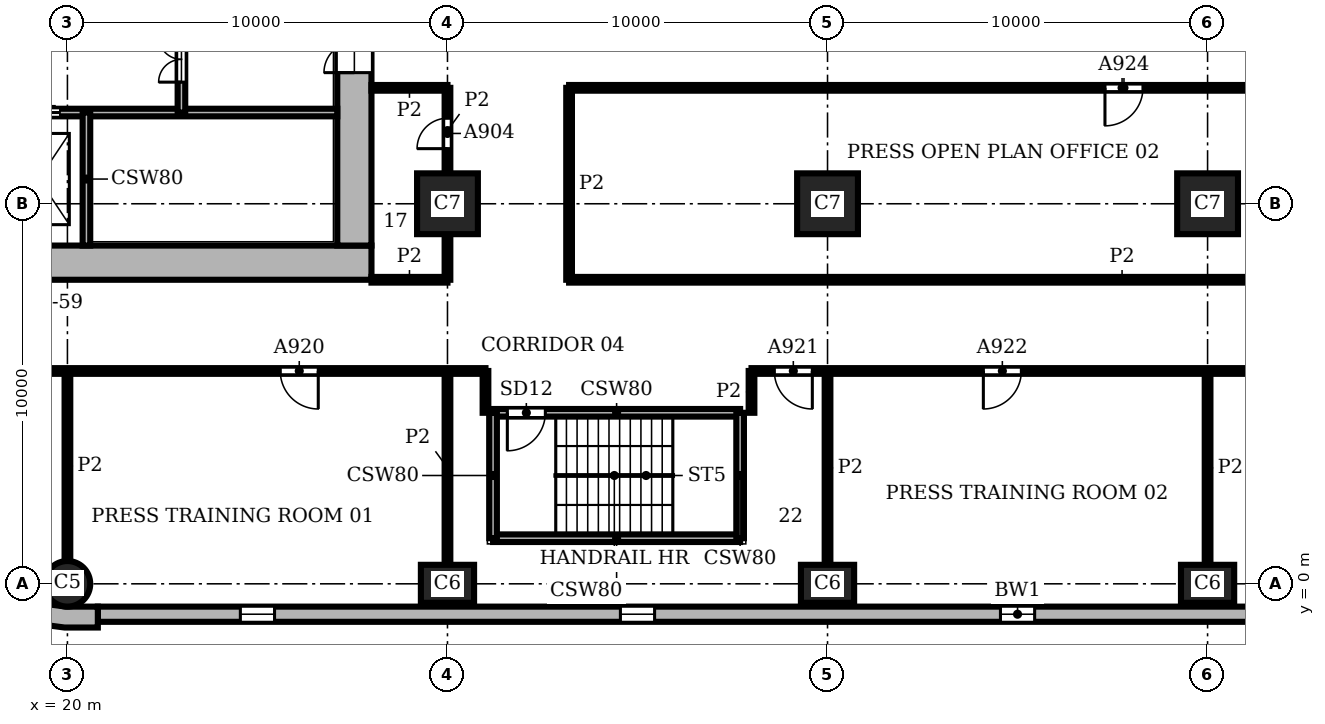
"""IFC4 building model, lengths in metres.
Left out: names, types, materials, properties, quantities, classifications, styles, units other than length and angle.
Written with IfcOpenShell. Run it as: python <this file> out.ifc"""

import sys

from ifc_helpers import new_model, si_unit, direction, frame, frame_2d, origin, origin_2d, place, context, subcontext, project, spatial, polyline, rectangle, circle, outline, extrude, element, fill, save


model = new_model("IFC4")
c1 = context("Model", 3, precision=1e-05, world=origin(), true_north=direction((0.0, 1.0)))
c2 = subcontext(c1, "Body", "Model", "MODEL_VIEW")
j1 = project(units=[si_unit("LENGTHUNIT", "METRE"), si_unit("PLANEANGLEUNIT", "RADIAN")], contexts=[c1])
p1 = place(None, origin())
s1 = spatial("IfcSite", under=j1, at=p1, CompositionType="ELEMENT")
p2 = place(p1, origin())
s2 = spatial("IfcBuilding", under=s1, at=p2, CompositionType="ELEMENT")
p3 = place(p2, frame((0.0, 0.0, 105.6)))
s3 = spatial("IfcBuildingStorey", under=s2, at=p3, CompositionType="ELEMENT", Elevation=105.6)
p4 = place(p3, frame((20.0, 0.0, 0.0), z_axis=(0.0, 0.0, 1.0), x_axis=(1.0, 0.0, 0.0)))
e1 = element("IfcColumn", 1, at=p4, inside=s3, PredefinedType="COLUMN", context=c2, shape_type="SweptSolid", body=[
    extrude(circle(Radius=0.6, at=origin_2d()), origin(), (0.0, 0.0, 1.0), 3.9),
])
for number, where, z_axis, x_axis in (
    (2, (30.0, 0.0, 0.0), (0.0, 0.0, 1.0), (1.0, 0.0, 0.0)),
    (3, (40.0, 0.0, 0.0), (0.0, 0.0, 1.0), (1.0, 0.0, 0.0)),
    (4, (50.0, 0.0, 0.0), (0.0, 0.0, 1.0), (1.0, 0.0, 0.0)),
):
    element("IfcColumn", number, at=place(p3, frame(where, z_axis=z_axis, x_axis=x_axis)), inside=s3, PredefinedType="COLUMN", context=c2, shape_type="SweptSolid", body=[
        extrude(rectangle(XDim=1.4, YDim=1.0, at=origin_2d()), origin(), (0.0, 0.0, 1.0), 3.9),
    ])
for number, where, z_axis, x_axis in (
    (5, (30.0, 10.0, 0.0), (0.0, 0.0, 1.0), (1.0, 0.0, 0.0)),
    (6, (40.0, 10.0, 0.0), (0.0, 0.0, 1.0), (1.0, 0.0, 0.0)),
    (7, (50.0, 10.0, 0.0), (0.0, 0.0, 1.0), (1.0, 0.0, 0.0)),
):
    element("IfcColumn", number, at=place(p3, frame(where, z_axis=z_axis, x_axis=x_axis)), inside=s3, PredefinedType="COLUMN", context=c2, shape_type="SweptSolid", body=[
        extrude(rectangle(XDim=1.6, YDim=1.6, at=origin_2d()), origin(), (0.0, 0.0, 1.0), 3.9),
    ])
p5 = place(p3, frame((8.0, 8.45, 0.0), z_axis=(0.0, 0.0, 1.0), x_axis=(1.0, 0.0, 0.0)))
e8 = element("IfcWall", 8, at=p5, inside=s3, PredefinedType="SHEAR", context=c2, shape_type="SweptSolid", body=[
    extrude(rectangle(XDim=20.0, YDim=0.9, at=frame_2d((10.0, 0.0))), origin(), (0.0, 0.0, 1.0), 3.9),
])
p6 = place(p3, frame((27.55, 8.9, 0.0), z_axis=(0.0, 0.0, 1.0), x_axis=(0.0, 1.0, 0.0)))
e9 = element("IfcWall", 9, at=p6, inside=s3, PredefinedType="SHEAR", context=c2, shape_type="SweptSolid", body=[
    extrude(rectangle(XDim=18.2, YDim=0.9, at=frame_2d((9.1, 0.0))), origin(), (0.0, 0.0, 1.0), 3.9),
])
p7 = place(p6, frame((4.55, 0.0, 0.0)))
e10 = element("IfcOpeningElement", 10, at=p7, cuts=e9, PredefinedType="OPENING", context=c2, shape_type="SweptSolid", body=[
    extrude(rectangle(XDim=1.6, YDim=2.1, at=frame_2d((0.8, 1.05))), frame((0.0, 0.46, 0.0), z_axis=(0.0, -1.0, 0.0), x_axis=(1.0, 0.0, 0.0)), (0.0, 0.0, 1.0), 0.92),
])
p8 = place(p3, origin())
e11 = element("IfcWall", 11, at=p8, inside=s3, PredefinedType="SOLIDWALL", context=c2, shape_type="SweptSolid", body=[
    extrude(outline(polyline([(19.076, -0.887), (19.057, -1.036), (19.925, -1.15), (20.8, -1.15), (20.8, -1.0), (20.8, -0.6), (19.961, -0.6), (19.128, -0.49), (19.076, -0.887)])), origin(), (0.0, 0.0, 1.0), 3.9),
])
p9 = place(p3, frame((20.8, -0.8, 0.0), z_axis=(0.0, 0.0, 1.0), x_axis=(1.0, 0.0, 0.0)))
e12 = element("IfcWall", 12, at=p9, inside=s3, PredefinedType="SOLIDWALL", context=c2, shape_type="SweptSolid", body=[
    extrude(rectangle(XDim=48.4, YDim=0.4, at=frame_2d((24.2, 0.0))), origin(), (0.0, 0.0, 1.0), 3.9),
])
p10 = place(p9, frame((3.75, 0.0, 0.9)))
e13 = element("IfcOpeningElement", 13, at=p10, cuts=e12, PredefinedType="OPENING", context=c2, shape_type="SweptSolid", body=[
    extrude(rectangle(XDim=0.9, YDim=2.35, at=frame_2d((0.45, 1.175))), frame((0.0, 0.21, 0.0), z_axis=(0.0, -1.0, 0.0), x_axis=(1.0, 0.0, 0.0)), (0.0, 0.0, 1.0), 0.42),
])
p11 = place(p9, frame((13.75, 0.0, 0.9)))
e14 = element("IfcOpeningElement", 14, at=p11, cuts=e12, PredefinedType="OPENING", context=c2, shape_type="SweptSolid", body=[
    extrude(rectangle(XDim=0.9, YDim=2.35, at=frame_2d((0.45, 1.175))), frame((0.0, 0.21, 0.0), z_axis=(0.0, -1.0, 0.0), x_axis=(1.0, 0.0, 0.0)), (0.0, 0.0, 1.0), 0.42),
])
p12 = place(p9, frame((23.75, 0.0, 0.9)))
e15 = element("IfcOpeningElement", 15, at=p12, cuts=e12, PredefinedType="OPENING", context=c2, shape_type="SweptSolid", body=[
    extrude(rectangle(XDim=0.9, YDim=2.35, at=frame_2d((0.45, 1.175))), frame((0.0, 0.21, 0.0), z_axis=(0.0, -1.0, 0.0), x_axis=(1.0, 0.0, 0.0)), (0.0, 0.0, 1.0), 0.42),
])
p13 = place(p9, frame((33.75, 0.0, 0.9)))
e16 = element("IfcOpeningElement", 16, at=p13, cuts=e12, PredefinedType="OPENING", context=c2, shape_type="SweptSolid", body=[
    extrude(rectangle(XDim=0.9, YDim=2.35, at=frame_2d((0.45, 1.175))), frame((0.0, 0.21, 0.0), z_axis=(0.0, -1.0, 0.0), x_axis=(1.0, 0.0, 0.0)), (0.0, 0.0, 1.0), 0.42),
])
p14 = place(p9, frame((43.75, 0.0, 0.9)))
e17 = element("IfcOpeningElement", 17, at=p14, cuts=e12, PredefinedType="OPENING", context=c2, shape_type="SweptSolid", body=[
    extrude(rectangle(XDim=0.9, YDim=2.35, at=frame_2d((0.45, 1.175))), frame((0.0, 0.21, 0.0), z_axis=(0.0, -1.0, 0.0), x_axis=(1.0, 0.0, 0.0)), (0.0, 0.0, 1.0), 0.42),
])
p15 = place(p3, frame((31.2, 1.2, 0.0), z_axis=(0.0, 0.0, 1.0), x_axis=(1.0, 0.0, 0.0)))
e18 = element("IfcWall", 18, at=p15, inside=s3, PredefinedType="SHEAR", context=c2, shape_type="SweptSolid", body=[
    extrude(rectangle(XDim=6.5, YDim=0.2, at=frame_2d((3.25, 0.0))), origin(), (0.0, 0.0, 1.0), 3.58),
])
p16 = place(p3, frame((31.2, 4.5, 0.0), z_axis=(0.0, 0.0, 1.0), x_axis=(1.0, 0.0, 0.0)))
e19 = element("IfcWall", 19, at=p16, inside=s3, PredefinedType="SHEAR", context=c2, shape_type="SweptSolid", body=[
    extrude(rectangle(XDim=6.5, YDim=0.2, at=frame_2d((3.25, 0.0))), origin(), (0.0, 0.0, 1.0), 3.58),
])
p17 = place(p16, frame((0.375, 0.0, 0.0)))
e20 = element("IfcOpeningElement", 20, at=p17, cuts=e19, PredefinedType="OPENING", context=c2, shape_type="SweptSolid", body=[
    extrude(rectangle(XDim=1.0, YDim=2.1, at=frame_2d((0.5, 1.05))), frame((0.0, 0.11, 0.0), z_axis=(0.0, -1.0, 0.0), x_axis=(1.0, 0.0, 0.0)), (0.0, 0.0, 1.0), 0.22),
])
p18 = place(p3, frame((13.8, 12.4, 0.0), z_axis=(0.0, 0.0, 1.0), x_axis=(1.0, 0.0, 0.0)))
e21 = element("IfcWall", 21, at=p18, inside=s3, PredefinedType="SHEAR", context=c2, shape_type="SweptSolid", body=[
    extrude(rectangle(XDim=13.3, YDim=0.2, at=frame_2d((6.65, 0.0))), origin(), (0.0, 0.0, 1.0), 3.58),
])
p19 = place(p18, frame((2.4, 0.0, 0.0)))
e22 = element("IfcOpeningElement", 22, at=p19, cuts=e21, PredefinedType="OPENING", context=c2, shape_type="SweptSolid", body=[
    extrude(rectangle(XDim=1.1, YDim=2.1, at=frame_2d((0.55, 1.05))), frame((0.0, 0.11, 0.0), z_axis=(0.0, -1.0, 0.0), x_axis=(1.0, 0.0, 0.0)), (0.0, 0.0, 1.0), 0.22),
])
p20 = place(p18, frame((4.9, 0.0, 0.0)))
e23 = element("IfcOpeningElement", 23, at=p20, cuts=e21, PredefinedType="OPENING", context=c2, shape_type="SweptSolid", body=[
    extrude(rectangle(XDim=1.1, YDim=2.1, at=frame_2d((0.55, 1.05))), frame((0.0, 0.11, 0.0), z_axis=(0.0, -1.0, 0.0), x_axis=(1.0, 0.0, 0.0)), (0.0, 0.0, 1.0), 0.22),
])
p21 = place(p18, frame((0.25, 0.0, 0.0)))
e24 = element("IfcOpeningElement", 24, at=p21, cuts=e21, PredefinedType="OPENING", context=c2, shape_type="SweptSolid", body=[
    extrude(rectangle(XDim=1.0, YDim=2.1, at=frame_2d((0.5, 1.05))), frame((0.0, 0.11, 0.0), z_axis=(0.0, -1.0, 0.0), x_axis=(1.0, 0.0, 0.0)), (0.0, 0.0, 1.0), 0.22),
])
p22 = place(p3, frame((20.5, 8.9, 0.0), z_axis=(0.0, 0.0, 1.0), x_axis=(0.0, 1.0, 0.0)))
e25 = element("IfcWall", 25, at=p22, inside=s3, PredefinedType="SHEAR", context=c2, shape_type="SweptSolid", body=[
    extrude(rectangle(XDim=3.5, YDim=0.2, at=frame_2d((1.75, 0.0))), origin(), (0.0, 0.0, 1.0), 3.58),
])
p23 = place(p3, frame((23.0, 12.4, 0.0), z_axis=(0.0, 0.0, 1.0), x_axis=(0.0, 1.0, 0.0)))
e26 = element("IfcWall", 26, at=p23, inside=s3, PredefinedType="SHEAR", context=c2, shape_type="SweptSolid", body=[
    extrude(rectangle(XDim=2.8, YDim=0.2, at=frame_2d((1.4, 0.0))), origin(), (0.0, 0.0, 1.0), 3.58),
])
p24 = place(p23, frame((0.8, 0.0, 0.0)))
e27 = element("IfcOpeningElement", 27, at=p24, cuts=e26, PredefinedType="OPENING", context=c2, shape_type="SweptSolid", body=[
    extrude(rectangle(XDim=1.2, YDim=2.1, at=frame_2d((0.6, 1.05))), frame((0.0, 0.11, 0.0), z_axis=(0.0, -1.0, 0.0), x_axis=(1.0, 0.0, 0.0)), (0.0, 0.0, 1.0), 0.22),
])
for number, where, z_axis, x_axis in (
    (28, (31.2, 1.2, 0.0), (0.0, 0.0, 1.0), (0.0, 1.0, 0.0)),
    (29, (37.7, 1.2, 0.0), (0.0, 0.0, 1.0), (0.0, 1.0, 0.0)),
):
    element("IfcWall", number, at=place(p3, frame(where, z_axis=z_axis, x_axis=x_axis)), inside=s3, PredefinedType="SHEAR", context=c2, shape_type="SweptSolid", body=[
        extrude(rectangle(XDim=3.3, YDim=0.2, at=frame_2d((1.65, 0.0))), origin(), (0.0, 0.0, 1.0), 3.58),
    ])
p25 = place(p3, frame((20.0, 0.6, 0.0), z_axis=(0.0, 0.0, 1.0), x_axis=(0.0, 1.0, 0.0)))
e30 = element("IfcWall", 30, at=p25, inside=s3, PredefinedType="PARTITIONING", context=c2, shape_type="SweptSolid", body=[
    extrude(rectangle(XDim=5.0, YDim=0.15, at=frame_2d((2.5, 0.0))), origin(), (0.0, 0.0, 1.0), 3.58),
])
p26 = place(p3, frame((30.0, 0.5, 0.0), z_axis=(0.0, 0.0, 1.0), x_axis=(0.0, 1.0, 0.0)))
e31 = element("IfcWall", 31, at=p26, inside=s3, PredefinedType="PARTITIONING", context=c2, shape_type="SweptSolid", body=[
    extrude(rectangle(XDim=5.1, YDim=0.15, at=frame_2d((2.55, 0.0))), origin(), (0.0, 0.0, 1.0), 3.58),
])
p27 = place(p3, frame((30.0, 8.0, 0.0), z_axis=(0.0, 0.0, 1.0), x_axis=(0.0, 1.0, 0.0)))
e32 = element("IfcWall", 32, at=p27, inside=s3, PredefinedType="PARTITIONING", context=c2, shape_type="SweptSolid", body=[
    extrude(rectangle(XDim=1.2, YDim=0.15, at=frame_2d((0.6, 0.0))), origin(), (0.0, 0.0, 1.0), 3.58),
])
p28 = place(p3, frame((30.0, 10.8, 0.0), z_axis=(0.0, 0.0, 1.0), x_axis=(0.0, 1.0, 0.0)))
e33 = element("IfcWall", 33, at=p28, inside=s3, PredefinedType="PARTITIONING", context=c2, shape_type="SweptSolid", body=[
    extrude(rectangle(XDim=2.25, YDim=0.15, at=frame_2d((1.125, 0.0))), origin(), (0.0, 0.0, 1.0), 3.58),
])
p29 = place(p28, frame((0.65, 0.0, 0.0)))
e34 = element("IfcOpeningElement", 34, at=p29, cuts=e33, PredefinedType="OPENING", context=c2, shape_type="SweptSolid", body=[
    extrude(rectangle(XDim=0.8, YDim=2.1, at=frame_2d((0.4, 1.05))), frame((0.0, 0.085, 0.0), z_axis=(0.0, -1.0, 0.0), x_axis=(1.0, 0.0, 0.0)), (0.0, 0.0, 1.0), 0.17),
])
p30 = place(p3, frame((31.0, 4.5, 0.0), z_axis=(0.0, 0.0, 1.0), x_axis=(0.0, 1.0, 0.0)))
e35 = element("IfcWall", 35, at=p30, inside=s3, PredefinedType="PARTITIONING", context=c2, shape_type="SweptSolid", body=[
    extrude(rectangle(XDim=1.1, YDim=0.15, at=frame_2d((0.55, 0.0))), origin(), (0.0, 0.0, 1.0), 3.58),
])
p31 = place(p3, frame((33.2, 8.0, 0.0), z_axis=(0.0, 0.0, 1.0), x_axis=(0.0, 1.0, 0.0)))
e36 = element("IfcWall", 36, at=p31, inside=s3, PredefinedType="PARTITIONING", context=c2, shape_type="SweptSolid", body=[
    extrude(rectangle(XDim=5.05, YDim=0.15, at=frame_2d((2.525, 0.0))), origin(), (0.0, 0.0, 1.0), 3.58),
])
p32 = place(p3, frame((38.0, 4.5, 0.0), z_axis=(0.0, 0.0, 1.0), x_axis=(0.0, 1.0, 0.0)))
e37 = element("IfcWall", 37, at=p32, inside=s3, PredefinedType="PARTITIONING", context=c2, shape_type="SweptSolid", body=[
    extrude(rectangle(XDim=1.1, YDim=0.15, at=frame_2d((0.55, 0.0))), origin(), (0.0, 0.0, 1.0), 3.58),
])
for number, where, z_axis, x_axis in (
    (38, (40.0, 0.5, 0.0), (0.0, 0.0, 1.0), (0.0, 1.0, 0.0)),
    (39, (50.0, 0.5, 0.0), (0.0, 0.0, 1.0), (0.0, 1.0, 0.0)),
):
    element("IfcWall", number, at=place(p3, frame(where, z_axis=z_axis, x_axis=x_axis)), inside=s3, PredefinedType="PARTITIONING", context=c2, shape_type="SweptSolid", body=[
        extrude(rectangle(XDim=5.1, YDim=0.15, at=frame_2d((2.55, 0.0))), origin(), (0.0, 0.0, 1.0), 3.58),
    ])
p33 = place(p3, frame((5.6, 5.6, 0.0), z_axis=(0.0, 0.0, 1.0), x_axis=(1.0, 0.0, 0.0)))
e40 = element("IfcWall", 40, at=p33, inside=s3, PredefinedType="PARTITIONING", context=c2, shape_type="SweptSolid", body=[
    extrude(rectangle(XDim=25.4, YDim=0.15, at=frame_2d((12.7, 0.0))), origin(), (0.0, 0.0, 1.0), 3.58),
])
p34 = place(p33, frame((3.6, 0.0, 0.0)))
e41 = element("IfcOpeningElement", 41, at=p34, cuts=e40, PredefinedType="OPENING", context=c2, shape_type="SweptSolid", body=[
    extrude(rectangle(XDim=1.0, YDim=2.1, at=frame_2d((0.5, 1.05))), frame((0.0, 0.085, 0.0), z_axis=(0.0, -1.0, 0.0), x_axis=(1.0, 0.0, 0.0)), (0.0, 0.0, 1.0), 0.17),
])
p35 = place(p33, frame((11.75, 0.0, 0.0)))
e42 = element("IfcOpeningElement", 42, at=p35, cuts=e40, PredefinedType="OPENING", context=c2, shape_type="SweptSolid", body=[
    extrude(rectangle(XDim=1.0, YDim=2.1, at=frame_2d((0.5, 1.05))), frame((0.0, 0.085, 0.0), z_axis=(0.0, -1.0, 0.0), x_axis=(1.0, 0.0, 0.0)), (0.0, 0.0, 1.0), 0.17),
])
p36 = place(p33, frame((20.0, 0.0, 0.0)))
e43 = element("IfcOpeningElement", 43, at=p36, cuts=e40, PredefinedType="OPENING", context=c2, shape_type="SweptSolid", body=[
    extrude(rectangle(XDim=1.0, YDim=2.1, at=frame_2d((0.5, 1.05))), frame((0.0, 0.085, 0.0), z_axis=(0.0, -1.0, 0.0), x_axis=(1.0, 0.0, 0.0)), (0.0, 0.0, 1.0), 0.17),
])
p37 = place(p3, frame((38.0, 5.6, 0.0), z_axis=(0.0, 0.0, 1.0), x_axis=(1.0, 0.0, 0.0)))
e44 = element("IfcWall", 44, at=p37, inside=s3, PredefinedType="PARTITIONING", context=c2, shape_type="SweptSolid", body=[
    extrude(rectangle(XDim=27.0, YDim=0.15, at=frame_2d((13.5, 0.0))), origin(), (0.0, 0.0, 1.0), 3.58),
])
p38 = place(p37, frame((0.6, 0.0, 0.0)))
e45 = element("IfcOpeningElement", 45, at=p38, cuts=e44, PredefinedType="OPENING", context=c2, shape_type="SweptSolid", body=[
    extrude(rectangle(XDim=1.0, YDim=2.1, at=frame_2d((0.5, 1.05))), frame((0.0, 0.085, 0.0), z_axis=(0.0, -1.0, 0.0), x_axis=(1.0, 0.0, 0.0)), (0.0, 0.0, 1.0), 0.17),
])
p39 = place(p37, frame((6.1, 0.0, 0.0)))
e46 = element("IfcOpeningElement", 46, at=p39, cuts=e44, PredefinedType="OPENING", context=c2, shape_type="SweptSolid", body=[
    extrude(rectangle(XDim=1.0, YDim=2.1, at=frame_2d((0.5, 1.05))), frame((0.0, 0.085, 0.0), z_axis=(0.0, -1.0, 0.0), x_axis=(1.0, 0.0, 0.0)), (0.0, 0.0, 1.0), 0.17),
])
p40 = place(p37, frame((15.85, 0.0, 0.0)))
e47 = element("IfcOpeningElement", 47, at=p40, cuts=e44, PredefinedType="OPENING", context=c2, shape_type="SweptSolid", body=[
    extrude(rectangle(XDim=1.0, YDim=2.1, at=frame_2d((0.5, 1.05))), frame((0.0, 0.085, 0.0), z_axis=(0.0, -1.0, 0.0), x_axis=(1.0, 0.0, 0.0)), (0.0, 0.0, 1.0), 0.17),
])
p41 = place(p3, frame((28.0, 8.0, 0.0), z_axis=(0.0, 0.0, 1.0), x_axis=(1.0, 0.0, 0.0)))
e48 = element("IfcWall", 48, at=p41, inside=s3, PredefinedType="PARTITIONING", context=c2, shape_type="SweptSolid", body=[
    extrude(rectangle(XDim=2.0, YDim=0.15, at=frame_2d((1.0, 0.0))), origin(), (0.0, 0.0, 1.0), 3.58),
])
p42 = place(p3, frame((33.2, 8.0, 0.0), z_axis=(0.0, 0.0, 1.0), x_axis=(1.0, 0.0, 0.0)))
e49 = element("IfcWall", 49, at=p42, inside=s3, PredefinedType="PARTITIONING", context=c2, shape_type="SweptSolid", body=[
    extrude(rectangle(XDim=29.1, YDim=0.15, at=frame_2d((14.55, 0.0))), origin(), (0.0, 0.0, 1.0), 3.58),
])
p43 = place(p3, frame((28.0, 13.05, 0.0), z_axis=(0.0, 0.0, 1.0), x_axis=(1.0, 0.0, 0.0)))
e50 = element("IfcWall", 50, at=p43, inside=s3, PredefinedType="PARTITIONING", context=c2, shape_type="SweptSolid", body=[
    extrude(rectangle(XDim=2.0, YDim=0.15, at=frame_2d((1.0, 0.0))), origin(), (0.0, 0.0, 1.0), 3.58),
])
p44 = place(p3, frame((33.2, 13.05, 0.0), z_axis=(0.0, 0.0, 1.0), x_axis=(1.0, 0.0, 0.0)))
e51 = element("IfcWall", 51, at=p44, inside=s3, PredefinedType="PARTITIONING", context=c2, shape_type="SweptSolid", body=[
    extrude(rectangle(XDim=29.1, YDim=0.15, at=frame_2d((14.55, 0.0))), origin(), (0.0, 0.0, 1.0), 3.58),
])
p45 = place(p44, frame((14.1, 0.0, 0.0)))
e52 = element("IfcOpeningElement", 52, at=p45, cuts=e51, PredefinedType="OPENING", context=c2, shape_type="SweptSolid", body=[
    extrude(rectangle(XDim=1.0, YDim=2.1, at=frame_2d((0.5, 1.05))), frame((0.0, 0.085, 0.0), z_axis=(0.0, -1.0, 0.0), x_axis=(1.0, 0.0, 0.0)), (0.0, 0.0, 1.0), 0.17),
])
p46 = place(p10, origin())
e53 = element("IfcWindow", 53, at=p46, inside=s3, PartitioningType="SINGLE_PANEL", PredefinedType="WINDOW", context=c2, shape_type="SweptSolid", body=[
    extrude(rectangle(XDim=0.9, YDim=2.35, at=frame_2d((0.45, 1.175))), frame((0.0, 0.16, 0.0), z_axis=(0.0, -1.0, 0.0), x_axis=(1.0, 0.0, 0.0)), (0.0, 0.0, 1.0), 0.06),
])
fill(e13, e53)
p47 = place(p11, origin())
e54 = element("IfcWindow", 54, at=p47, inside=s3, PartitioningType="SINGLE_PANEL", PredefinedType="WINDOW", context=c2, shape_type="SweptSolid", body=[
    extrude(rectangle(XDim=0.9, YDim=2.35, at=frame_2d((0.45, 1.175))), frame((0.0, 0.16, 0.0), z_axis=(0.0, -1.0, 0.0), x_axis=(1.0, 0.0, 0.0)), (0.0, 0.0, 1.0), 0.06),
])
fill(e14, e54)
p48 = place(p12, origin())
e55 = element("IfcWindow", 55, at=p48, inside=s3, PartitioningType="SINGLE_PANEL", PredefinedType="WINDOW", context=c2, shape_type="SweptSolid", body=[
    extrude(rectangle(XDim=0.9, YDim=2.35, at=frame_2d((0.45, 1.175))), frame((0.0, 0.16, 0.0), z_axis=(0.0, -1.0, 0.0), x_axis=(1.0, 0.0, 0.0)), (0.0, 0.0, 1.0), 0.06),
])
fill(e15, e55)
p49 = place(p20, origin())
e56 = element("IfcDoor", 56, at=p49, inside=s3, OperationType="DOUBLE_DOOR_SLIDING", PredefinedType="DOOR", context=c2, shape_type="SweptSolid", body=[
    extrude(rectangle(XDim=1.1, YDim=2.1, at=frame_2d((0.55, 1.05))), frame((0.0, 0.025, 0.0), z_axis=(0.0, -1.0, 0.0), x_axis=(1.0, 0.0, 0.0)), (0.0, 0.0, 1.0), 0.05),
])
fill(e23, e56)
p50 = place(p17, frame((1.0, 0.0, 0.0), z_axis=(0.0, 0.0, 1.0), x_axis=(-1.0, 0.0, 0.0)))
e57 = element("IfcDoor", 57, at=p50, inside=s3, OperationType="SINGLE_SWING_RIGHT", PredefinedType="DOOR", context=c2, shape_type="SweptSolid", body=[
    extrude(rectangle(XDim=1.0, YDim=2.1, at=frame_2d((0.5, 1.05))), frame((0.0, 0.025, 0.0), z_axis=(0.0, -1.0, 0.0), x_axis=(1.0, 0.0, 0.0)), (0.0, 0.0, 1.0), 0.05),
])
fill(e20, e57)
p51 = place(p24, origin())
e58 = element("IfcDoor", 58, at=p51, inside=s3, OperationType="DOUBLE_DOOR_SINGLE_SWING", PredefinedType="DOOR", context=c2, shape_type="SweptSolid", body=[
    extrude(rectangle(XDim=1.2, YDim=2.1, at=frame_2d((0.6, 1.05))), frame((0.0, 0.025, 0.0), z_axis=(0.0, -1.0, 0.0), x_axis=(1.0, 0.0, 0.0)), (0.0, 0.0, 1.0), 0.05),
])
fill(e27, e58)
p52 = place(p7, origin())
e59 = element("IfcDoor", 59, at=p52, inside=s3, OperationType="DOUBLE_DOOR_SINGLE_SWING", PredefinedType="DOOR", context=c2, shape_type="SweptSolid", body=[
    extrude(rectangle(XDim=1.6, YDim=2.1, at=frame_2d((0.8, 1.05))), frame((0.0, 0.025, 0.0), z_axis=(0.0, -1.0, 0.0), x_axis=(1.0, 0.0, 0.0)), (0.0, 0.0, 1.0), 0.05),
])
fill(e10, e59)
p53 = place(p29, origin())
e60 = element("IfcDoor", 60, at=p53, inside=s3, OperationType="SINGLE_SWING_LEFT", PredefinedType="DOOR", context=c2, shape_type="SweptSolid", body=[
    extrude(rectangle(XDim=0.8, YDim=2.1, at=frame_2d((0.4, 1.05))), frame((0.0, 0.025, 0.0), z_axis=(0.0, -1.0, 0.0), x_axis=(1.0, 0.0, 0.0)), (0.0, 0.0, 1.0), 0.05),
])
fill(e34, e60)
p54 = place(p36, frame((1.0, 0.0, 0.0), z_axis=(0.0, 0.0, 1.0), x_axis=(-1.0, 0.0, 0.0)))
e61 = element("IfcDoor", 61, at=p54, inside=s3, OperationType="SINGLE_SWING_LEFT", PredefinedType="DOOR", context=c2, shape_type="SweptSolid", body=[
    extrude(rectangle(XDim=1.0, YDim=2.1, at=frame_2d((0.5, 1.05))), frame((0.0, 0.025, 0.0), z_axis=(0.0, -1.0, 0.0), x_axis=(1.0, 0.0, 0.0)), (0.0, 0.0, 1.0), 0.05),
])
fill(e43, e61)
p55 = place(p38, frame((1.0, 0.0, 0.0), z_axis=(0.0, 0.0, 1.0), x_axis=(-1.0, 0.0, 0.0)))
e62 = element("IfcDoor", 62, at=p55, inside=s3, OperationType="SINGLE_SWING_LEFT", PredefinedType="DOOR", context=c2, shape_type="SweptSolid", body=[
    extrude(rectangle(XDim=1.0, YDim=2.1, at=frame_2d((0.5, 1.05))), frame((0.0, 0.025, 0.0), z_axis=(0.0, -1.0, 0.0), x_axis=(1.0, 0.0, 0.0)), (0.0, 0.0, 1.0), 0.05),
])
fill(e45, e62)
p56 = place(p39, frame((1.0, 0.0, 0.0), z_axis=(0.0, 0.0, 1.0), x_axis=(-1.0, 0.0, 0.0)))
e63 = element("IfcDoor", 63, at=p56, inside=s3, OperationType="SINGLE_SWING_RIGHT", PredefinedType="DOOR", context=c2, shape_type="SweptSolid", body=[
    extrude(rectangle(XDim=1.0, YDim=2.1, at=frame_2d((0.5, 1.05))), frame((0.0, 0.025, 0.0), z_axis=(0.0, -1.0, 0.0), x_axis=(1.0, 0.0, 0.0)), (0.0, 0.0, 1.0), 0.05),
])
fill(e46, e63)
p57 = place(p45, frame((1.0, 0.0, 0.0), z_axis=(0.0, 0.0, 1.0), x_axis=(-1.0, 0.0, 0.0)))
e64 = element("IfcDoor", 64, at=p57, inside=s3, OperationType="SINGLE_SWING_RIGHT", PredefinedType="DOOR", context=c2, shape_type="SweptSolid", body=[
    extrude(rectangle(XDim=1.0, YDim=2.1, at=frame_2d((0.5, 1.05))), frame((0.0, 0.025, 0.0), z_axis=(0.0, -1.0, 0.0), x_axis=(1.0, 0.0, 0.0)), (0.0, 0.0, 1.0), 0.05),
])
fill(e52, e64)
save(model, sys.argv[1])
